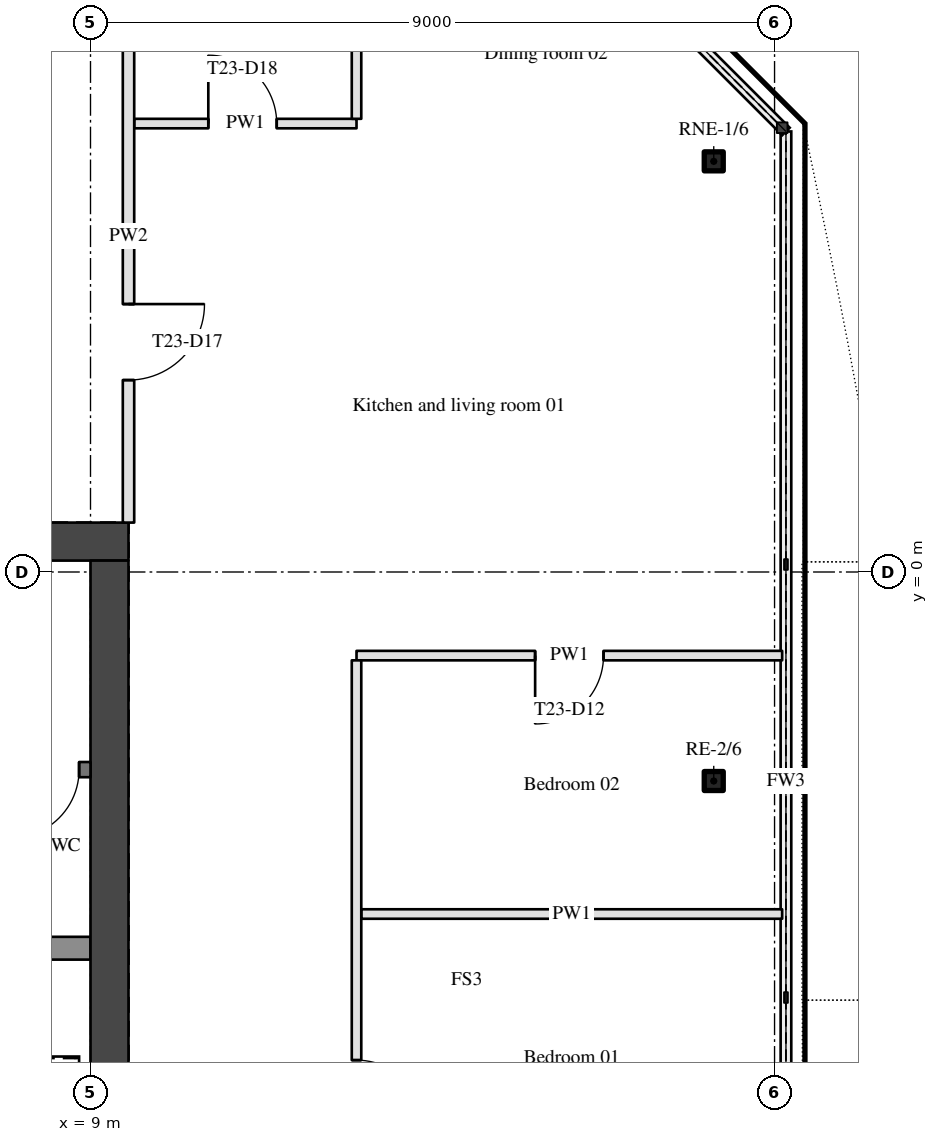
"""IFC4 building model, lengths in metres.
Left out: names, types, materials, properties, quantities, classifications, styles, units other than length and angle.
Written with IfcOpenShell. Run it as: python <this file> out.ifc"""

import sys

from ifc_helpers import new_model, si_unit, direction, frame, frame_2d, origin, origin_2d, place, context, subcontext, project, spatial, rectangle, hollow_rectangle, extrude, element, fill, save


model = new_model("IFC4")
c1 = context("Model", 3, precision=1e-05, world=origin(), true_north=direction((0.0, 1.0)))
c2 = subcontext(c1, "Body", "Model", "MODEL_VIEW")
j1 = project(units=[si_unit("LENGTHUNIT", "METRE"), si_unit("PLANEANGLEUNIT", "RADIAN")], contexts=[c1])
p1 = place(None, origin())
s1 = spatial("IfcSite", under=j1, at=p1, CompositionType="ELEMENT")
p2 = place(p1, origin())
s2 = spatial("IfcBuilding", under=s1, at=p2, CompositionType="ELEMENT")
p3 = place(p2, frame((0.0, 0.0, 294.15)))
s3 = spatial("IfcBuildingStorey", under=s2, at=p3, CompositionType="ELEMENT", Elevation=294.15)
for number, where, z_axis, x_axis in (
    (1, (17.2, -2.75, 0.0), (0.0, 0.0, 1.0), (1.0, 0.0, 0.0)),
    (2, (17.2, 5.403, 0.0), (0.0, 0.0, 1.0), (1.0, 0.0, 0.0)),
):
    element("IfcColumn", number, at=place(p3, frame(where, z_axis=z_axis, x_axis=x_axis)), inside=s3, PredefinedType="COLUMN", context=c2, shape_type="SweptSolid", body=[
        extrude(hollow_rectangle(XDim=0.25, YDim=0.25, WallThickness=0.02, InnerFilletRadius=0.03, OuterFilletRadius=0.05, at=origin_2d()), origin(), (0.0, 0.0, 1.0), 3.15),
    ])
p4 = place(p3, frame((-9.5, 0.4, 0.0), z_axis=(0.0, 0.0, 1.0), x_axis=(1.0, 0.0, 0.0)))
e3 = element("IfcWall", 3, at=p4, inside=s3, PredefinedType="SHEAR", context=c2, shape_type="SweptSolid", body=[
    extrude(rectangle(XDim=19.0, YDim=0.5, at=frame_2d((9.5, 0.0))), origin(), (0.0, 0.0, 1.0), 3.15),
])
p5 = place(p4, frame((8.6, 0.0, 0.0)))
e4 = element("IfcOpeningElement", 4, at=p5, cuts=e3, PredefinedType="OPENING", context=c2, shape_type="SweptSolid", body=[
    extrude(rectangle(XDim=1.8, YDim=2.1, at=frame_2d((0.9, 1.05))), frame((0.0, 0.26, 0.0), z_axis=(0.0, -1.0, 0.0), x_axis=(1.0, 0.0, 0.0)), (0.0, 0.0, 1.0), 0.52),
])
p6 = place(p4, frame((15.55, 0.0, 0.0)))
e5 = element("IfcOpeningElement", 5, at=p6, cuts=e3, PredefinedType="OPENING", context=c2, shape_type="SweptSolid", body=[
    extrude(rectangle(XDim=0.9, YDim=2.1, at=frame_2d((0.45, 1.05))), frame((0.0, 0.26, 0.0), z_axis=(0.0, -1.0, 0.0), x_axis=(1.0, 0.0, 0.0)), (0.0, 0.0, 1.0), 0.52),
])
p7 = place(p3, frame((9.25, -11.5, 0.0), z_axis=(0.0, 0.0, 1.0), x_axis=(0.0, 1.0, 0.0)))
e6 = element("IfcWall", 6, at=p7, inside=s3, PredefinedType="SHEAR", context=c2, shape_type="SweptSolid", body=[
    extrude(rectangle(XDim=11.65, YDim=0.5, at=frame_2d((5.825, 0.0))), origin(), (0.0, 0.0, 1.0), 3.15),
])
p8 = place(p3, frame((2.25, -4.95, 0.0), z_axis=(0.0, 0.0, 1.0), x_axis=(1.0, 0.0, 0.0)))
e7 = element("IfcWall", 7, at=p8, inside=s3, PredefinedType="SHEAR", context=c2, shape_type="SweptSolid", body=[
    extrude(rectangle(XDim=6.75, YDim=0.3, at=frame_2d((3.375, 0.0))), origin(), (0.0, 0.0, 1.0), 3.15),
])
p9 = place(p3, frame((12.562, -4.5, 0.0), z_axis=(0.0, 0.0, 1.0), x_axis=(1.0, 0.0, 0.0)))
e8 = element("IfcWall", 8, at=p9, inside=s3, PredefinedType="PARTITIONING", context=c2, shape_type="SweptSolid", body=[
    extrude(rectangle(XDim=5.538, YDim=0.125, at=frame_2d((2.769, 0.0))), origin(), (0.0, 0.0, 1.0), 2.21),
])
p10 = place(p3, frame((9.0, -2.6, 0.0), z_axis=(0.0, 0.0, 1.0), x_axis=(-1.0, 0.0, 0.0)))
e9 = element("IfcWall", 9, at=p10, inside=s3, PredefinedType="SOLIDWALL", context=c2, shape_type="SweptSolid", body=[
    extrude(rectangle(XDim=1.2, YDim=0.2, at=frame_2d((0.6, 0.0))), origin(), (0.0, 0.0, 1.0), 2.85),
])
p11 = place(p10, frame((0.15, 0.0, 0.0)))
e10 = element("IfcOpeningElement", 10, at=p11, cuts=e9, PredefinedType="OPENING", context=c2, shape_type="SweptSolid", body=[
    extrude(rectangle(XDim=0.9, YDim=2.1, at=frame_2d((0.45, 1.05))), frame((0.0, 0.11, 0.0), z_axis=(0.0, -1.0, 0.0), x_axis=(1.0, 0.0, 0.0)), (0.0, 0.0, 1.0), 0.22),
])
p12 = place(p3, frame((18.1, -1.1, 0.0), z_axis=(0.0, 0.0, 1.0), x_axis=(-1.0, 0.0, 0.0)))
e11 = element("IfcWall", 11, at=p12, inside=s3, PredefinedType="PARTITIONING", context=c2, shape_type="SweptSolid", body=[
    extrude(rectangle(XDim=5.6, YDim=0.125, at=frame_2d((2.8, 0.0))), origin(), (0.0, 0.0, 1.0), 2.21),
])
p13 = place(p12, frame((2.35, 0.0, 0.0)))
e12 = element("IfcOpeningElement", 12, at=p13, cuts=e11, PredefinedType="OPENING", context=c2, shape_type="SweptSolid", body=[
    extrude(rectangle(XDim=0.9, YDim=2.1, at=frame_2d((0.45, 1.05))), frame((0.0, 0.073, 0.0), z_axis=(0.0, -1.0, 0.0), x_axis=(1.0, 0.0, 0.0)), (0.0, 0.0, 1.0), 0.145),
])
p14 = place(p3, frame((9.575, 5.9, 0.0), z_axis=(0.0, 0.0, 1.0), x_axis=(1.0, 0.0, 0.0)))
e13 = element("IfcWall", 13, at=p14, inside=s3, PredefinedType="PARTITIONING", context=c2, shape_type="SweptSolid", body=[
    extrude(rectangle(XDim=2.925, YDim=0.125, at=frame_2d((1.462, 0.0))), origin(), (0.0, 0.0, 1.0), 2.21),
])
p15 = place(p14, frame((0.975, 0.0, 0.0)))
e14 = element("IfcOpeningElement", 14, at=p15, cuts=e13, PredefinedType="OPENING", context=c2, shape_type="SweptSolid", body=[
    extrude(rectangle(XDim=0.9, YDim=2.1, at=frame_2d((0.45, 1.05))), frame((0.0, 0.073, 0.0), z_axis=(0.0, -1.0, 0.0), x_axis=(1.0, 0.0, 0.0)), (0.0, 0.0, 1.0), 0.145),
])
p16 = place(p3, frame((9.5, 8.2, 0.0), z_axis=(0.0, 0.0, 1.0), x_axis=(0.0, -1.0, 0.0)))
e15 = element("IfcWall", 15, at=p16, inside=s3, PredefinedType="PARTITIONING", context=c2, shape_type="SweptSolid", body=[
    extrude(rectangle(XDim=7.55, YDim=0.15, at=frame_2d((3.775, 0.0))), origin(), (0.0, 0.0, 1.0), 2.21),
])
p17 = place(p16, frame((4.675, 0.0, 0.0)))
e16 = element("IfcOpeningElement", 16, at=p17, cuts=e15, PredefinedType="OPENING", context=c2, shape_type="SweptSolid", body=[
    extrude(rectangle(XDim=1.0, YDim=2.1, at=frame_2d((0.5, 1.05))), frame((0.0, 0.085, 0.0), z_axis=(0.0, -1.0, 0.0), x_axis=(1.0, 0.0, 0.0)), (0.0, 0.0, 1.0), 0.17),
])
p18 = place(p3, frame((12.5, -1.163, 0.0), z_axis=(0.0, 0.0, 1.0), x_axis=(0.0, -1.0, 0.0)))
e17 = element("IfcWall", 17, at=p18, inside=s3, PredefinedType="PARTITIONING", context=c2, shape_type="SweptSolid", body=[
    extrude(rectangle(XDim=10.775, YDim=0.125, at=frame_2d((5.387, 0.0))), origin(), (0.0, 0.0, 1.0), 2.21),
])
p19 = place(p18, frame((5.26, 0.0, 0.0)))
e18 = element("IfcOpeningElement", 18, at=p19, cuts=e17, PredefinedType="OPENING", context=c2, shape_type="SweptSolid", body=[
    extrude(rectangle(XDim=0.9, YDim=2.1, at=frame_2d((0.45, 1.05))), frame((0.0, 0.073, 0.0), z_axis=(0.0, -1.0, 0.0), x_axis=(1.0, 0.0, 0.0)), (0.0, 0.0, 1.0), 0.145),
])
p20 = place(p18, frame((7.438, 0.0, 0.0)))
e19 = element("IfcOpeningElement", 19, at=p20, cuts=e17, PredefinedType="OPENING", context=c2, shape_type="SweptSolid", body=[
    extrude(rectangle(XDim=1.0, YDim=2.1, at=frame_2d((0.5, 1.05))), frame((0.0, 0.073, 0.0), z_axis=(0.0, -1.0, 0.0), x_axis=(1.0, 0.0, 0.0)), (0.0, 0.0, 1.0), 0.145),
])
p21 = place(p18, frame((9.337, 0.0, 0.0)))
e20 = element("IfcOpeningElement", 20, at=p21, cuts=e17, PredefinedType="OPENING", context=c2, shape_type="SweptSolid", body=[
    extrude(rectangle(XDim=0.9, YDim=2.1, at=frame_2d((0.45, 1.05))), frame((0.0, 0.073, 0.0), z_axis=(0.0, -1.0, 0.0), x_axis=(1.0, 0.0, 0.0)), (0.0, 0.0, 1.0), 0.145),
])
p22 = place(p3, frame((12.5, 5.962, 0.0), z_axis=(0.0, 0.0, 1.0), x_axis=(0.0, 1.0, 0.0)))
e21 = element("IfcWall", 21, at=p22, inside=s3, PredefinedType="PARTITIONING", context=c2, shape_type="SweptSolid", body=[
    extrude(rectangle(XDim=2.238, YDim=0.125, at=frame_2d((1.119, 0.0))), origin(), (0.0, 0.0, 1.0), 2.21),
])
p23 = place(p17, origin())
e22 = element("IfcDoor", 22, at=p23, inside=s3, OperationType="SINGLE_SWING_LEFT", PredefinedType="DOOR", context=c2, shape_type="SweptSolid", body=[
    extrude(rectangle(XDim=1.0, YDim=2.1, at=frame_2d((0.5, 1.05))), frame((0.0, 0.025, 0.0), z_axis=(0.0, -1.0, 0.0), x_axis=(1.0, 0.0, 0.0)), (0.0, 0.0, 1.0), 0.05),
])
fill(e16, e22)
p24 = place(p11, origin())
e23 = element("IfcDoor", 23, at=p24, inside=s3, OperationType="SINGLE_SWING_RIGHT", PredefinedType="DOOR", context=c2, shape_type="SweptSolid", body=[
    extrude(rectangle(XDim=0.9, YDim=2.1, at=frame_2d((0.45, 1.05))), frame((0.0, 0.025, 0.0), z_axis=(0.0, -1.0, 0.0), x_axis=(1.0, 0.0, 0.0)), (0.0, 0.0, 1.0), 0.05),
])
fill(e10, e23)
p25 = place(p19, origin())
e24 = element("IfcDoor", 24, at=p25, inside=s3, OperationType="SINGLE_SWING_RIGHT", PredefinedType="DOOR", context=c2, shape_type="SweptSolid", body=[
    extrude(rectangle(XDim=0.9, YDim=2.1, at=frame_2d((0.45, 1.05))), frame((0.0, 0.025, 0.0), z_axis=(0.0, -1.0, 0.0), x_axis=(1.0, 0.0, 0.0)), (0.0, 0.0, 1.0), 0.05),
])
fill(e18, e24)
p26 = place(p15, origin())
e25 = element("IfcDoor", 25, at=p26, inside=s3, OperationType="SINGLE_SWING_LEFT", PredefinedType="DOOR", context=c2, shape_type="SweptSolid", body=[
    extrude(rectangle(XDim=0.9, YDim=2.1, at=frame_2d((0.45, 1.05))), frame((0.0, 0.025, 0.0), z_axis=(0.0, -1.0, 0.0), x_axis=(1.0, 0.0, 0.0)), (0.0, 0.0, 1.0), 0.05),
])
fill(e14, e25)
p27 = place(p13, origin())
e26 = element("IfcDoor", 26, at=p27, inside=s3, OperationType="SINGLE_SWING_RIGHT", PredefinedType="DOOR", context=c2, shape_type="SweptSolid", body=[
    extrude(rectangle(XDim=0.9, YDim=2.1, at=frame_2d((0.45, 1.05))), frame((0.0, 0.025, 0.0), z_axis=(0.0, -1.0, 0.0), x_axis=(1.0, 0.0, 0.0)), (0.0, 0.0, 1.0), 0.05),
])
fill(e12, e26)
save(model, sys.argv[1])
